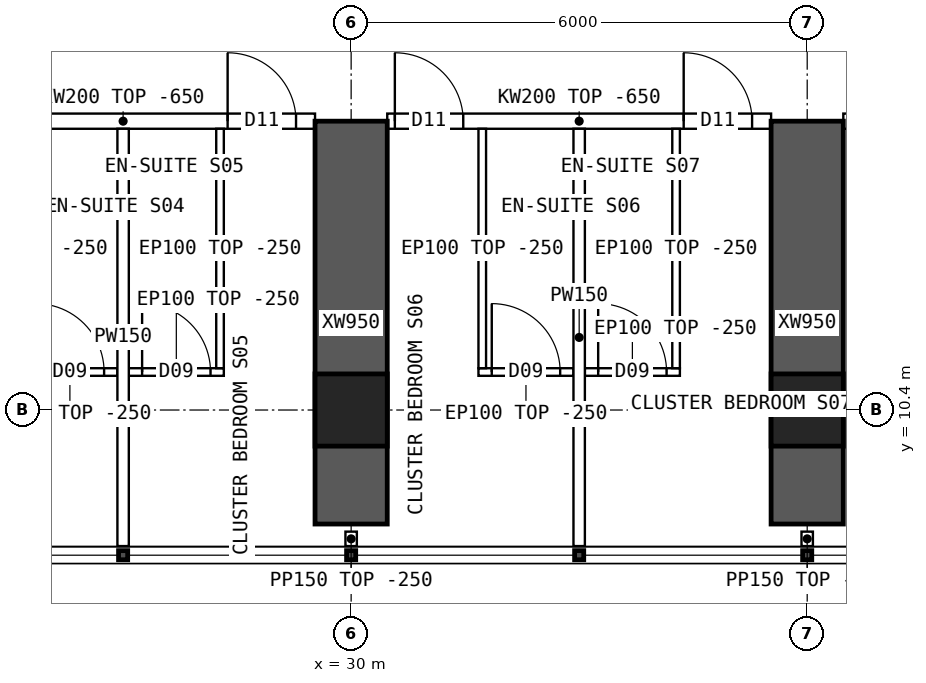
"""IFC4 building model, lengths in metres.
Left out: names, types, materials, properties, quantities, classifications, styles, units other than length and angle.
Written with IfcOpenShell. Run it as: python <this file> out.ifc"""

import sys

from ifc_helpers import new_model, si_unit, direction, frame, frame_2d, origin, origin_2d, place, context, subcontext, project, spatial, polyline, rectangle, hollow_rectangle, outline, extrude, element, fill, save


model = new_model("IFC4")
c1 = context("Model", 3, precision=1e-05, world=origin(), true_north=direction((0.0, 1.0)))
c2 = subcontext(c1, "Body", "Model", "MODEL_VIEW")
j1 = project(units=[si_unit("LENGTHUNIT", "METRE"), si_unit("PLANEANGLEUNIT", "RADIAN")], contexts=[c1])
p1 = place(None, origin())
s1 = spatial("IfcSite", under=j1, at=p1, CompositionType="ELEMENT")
p2 = place(p1, origin())
s2 = spatial("IfcBuilding", under=s1, at=p2, CompositionType="ELEMENT")
p3 = place(p2, frame((0.0, 0.0, 118.15)))
s3 = spatial("IfcBuildingStorey", under=s2, at=p3, CompositionType="ELEMENT", Elevation=118.15)
for number, where, z_axis, x_axis in (
    (1, (30.0, 10.4, 0.0), (0.0, 0.0, 1.0), (1.0, 0.0, 0.0)),
    (2, (36.0, 10.4, 0.0), (0.0, 0.0, 1.0), (1.0, 0.0, 0.0)),
):
    element("IfcColumn", number, at=place(p3, frame(where, z_axis=z_axis, x_axis=x_axis)), inside=s3, PredefinedType="COLUMN", context=c2, shape_type="SweptSolid", body=[
        extrude(hollow_rectangle(XDim=0.95, YDim=0.95, WallThickness=0.095, at=origin_2d()), origin(), (0.0, 0.0, 1.0), 3.75),
    ])
for number, where, z_axis, x_axis in (
    (3, (30.0, 8.9, 0.0), (0.0, 0.0, 1.0), (0.0, 1.0, 0.0)),
    (4, (36.0, 8.9, 0.0), (0.0, 0.0, 1.0), (0.0, 1.0, 0.0)),
):
    element("IfcWall", number, at=place(p3, frame(where, z_axis=z_axis, x_axis=x_axis)), inside=s3, PredefinedType="SHEAR", context=c2, shape_type="SweptSolid", body=[
        extrude(rectangle(XDim=5.3, YDim=0.95, at=frame_2d((2.65, 0.0))), origin(), (0.0, 0.0, 1.0), 3.75),
    ])
p4 = place(p3, frame((24.475, 14.2, 0.0), z_axis=(0.0, 0.0, 1.0), x_axis=(1.0, 0.0, 0.0)))
e5 = element("IfcWall", 5, at=p4, inside=s3, PredefinedType="SOLIDWALL", context=c2, shape_type="SweptSolid", body=[
    extrude(outline(polyline([(0.0, 0.0), (5.05, 0.0), (5.05, 3.1), (0.0, 3.1), (0.0, 0.0)])), frame((0.0, 0.1, 0.0), z_axis=(0.0, -1.0, 0.0), x_axis=(1.0, 0.0, 0.0)), (0.0, 0.0, 1.0), 0.2),
])
p5 = place(p4, frame((0.1, 0.0, 0.0)))
e6 = element("IfcOpeningElement", 6, at=p5, cuts=e5, PredefinedType="OPENING", context=c2, shape_type="SweptSolid", body=[
    extrude(rectangle(XDim=0.9, YDim=2.1, at=frame_2d((0.45, 1.05))), frame((0.0, 0.11, 0.0), z_axis=(0.0, -1.0, 0.0), x_axis=(1.0, 0.0, 0.0)), (0.0, 0.0, 1.0), 0.22),
])
p6 = place(p4, frame((3.9, 0.0, 0.0)))
e7 = element("IfcOpeningElement", 7, at=p6, cuts=e5, PredefinedType="OPENING", context=c2, shape_type="SweptSolid", body=[
    extrude(rectangle(XDim=0.9, YDim=2.1, at=frame_2d((0.45, 1.05))), frame((0.0, 0.11, 0.0), z_axis=(0.0, -1.0, 0.0), x_axis=(1.0, 0.0, 0.0)), (0.0, 0.0, 1.0), 0.22),
])
p7 = place(p3, frame((30.475, 14.2, 0.0), z_axis=(0.0, 0.0, 1.0), x_axis=(1.0, 0.0, 0.0)))
e8 = element("IfcWall", 8, at=p7, inside=s3, PredefinedType="SOLIDWALL", context=c2, shape_type="SweptSolid", body=[
    extrude(outline(polyline([(0.0, 0.0), (5.05, 0.0), (5.05, 3.1), (0.0, 3.1), (0.0, 0.0)])), frame((0.0, 0.1, 0.0), z_axis=(0.0, -1.0, 0.0), x_axis=(1.0, 0.0, 0.0)), (0.0, 0.0, 1.0), 0.2),
])
p8 = place(p7, frame((0.1, 0.0, 0.0)))
e9 = element("IfcOpeningElement", 9, at=p8, cuts=e8, PredefinedType="OPENING", context=c2, shape_type="SweptSolid", body=[
    extrude(rectangle(XDim=0.9, YDim=2.1, at=frame_2d((0.45, 1.05))), frame((0.0, 0.11, 0.0), z_axis=(0.0, -1.0, 0.0), x_axis=(1.0, 0.0, 0.0)), (0.0, 0.0, 1.0), 0.22),
])
p9 = place(p7, frame((3.9, 0.0, 0.0)))
e10 = element("IfcOpeningElement", 10, at=p9, cuts=e8, PredefinedType="OPENING", context=c2, shape_type="SweptSolid", body=[
    extrude(rectangle(XDim=0.9, YDim=2.1, at=frame_2d((0.45, 1.05))), frame((0.0, 0.11, 0.0), z_axis=(0.0, -1.0, 0.0), x_axis=(1.0, 0.0, 0.0)), (0.0, 0.0, 1.0), 0.22),
])
p10 = place(p3, frame((36.475, 14.2, 0.0), z_axis=(0.0, 0.0, 1.0), x_axis=(1.0, 0.0, 0.0)))
e11 = element("IfcWall", 11, at=p10, inside=s3, PredefinedType="SOLIDWALL", context=c2, shape_type="SweptSolid", body=[
    extrude(outline(polyline([(0.0, 0.0), (5.05, 0.0), (5.05, 3.1), (0.0, 3.1), (0.0, 0.0)])), frame((0.0, 0.1, 0.0), z_axis=(0.0, -1.0, 0.0), x_axis=(1.0, 0.0, 0.0)), (0.0, 0.0, 1.0), 0.2),
])
p11 = place(p10, frame((0.3, 0.0, 0.0)))
e12 = element("IfcOpeningElement", 12, at=p11, cuts=e11, PredefinedType="OPENING", context=c2, shape_type="SweptSolid", body=[
    extrude(rectangle(XDim=1.0, YDim=2.1, at=frame_2d((0.5, 1.05))), frame((0.0, 0.11, 0.0), z_axis=(0.0, -1.0, 0.0), x_axis=(1.0, 0.0, 0.0)), (0.0, 0.0, 1.0), 0.22),
])
p12 = place(p3, frame((27.0, 8.61, 0.0), z_axis=(0.0, 0.0, 1.0), x_axis=(0.0, 1.0, 0.0)))
e13 = element("IfcWall", 13, at=p12, inside=s3, PredefinedType="PARTITIONING", context=c2, shape_type="SweptSolid", body=[
    extrude(outline(polyline([(0.0, 0.0), (5.49, 0.0), (5.49, 3.1), (5.442, 3.1), (5.44, 3.5), (1.992, 3.5), (1.99, 3.1), (1.592, 3.1), (1.59, 3.5), (0.0, 3.5), (0.0, 0.0)])), frame((0.0, 0.075, 0.0), z_axis=(0.0, -1.0, 0.0), x_axis=(1.0, 0.0, 0.0)), (0.0, 0.0, 1.0), 0.15),
])
p13 = place(p3, frame((26.925, 10.9, 0.0), z_axis=(0.0, 0.0, 1.0), x_axis=(-1.0, 0.0, 0.0)))
e14 = element("IfcWall", 14, at=p13, inside=s3, PredefinedType="PARTITIONING", context=c2, shape_type="SweptSolid", body=[
    extrude(rectangle(XDim=1.25, YDim=0.1, at=frame_2d((0.625, 0.0))), origin(), (0.0, 0.0, 1.0), 3.5),
])
p14 = place(p13, frame((0.175, 0.0, 0.0)))
e15 = element("IfcOpeningElement", 15, at=p14, cuts=e14, PredefinedType="OPENING", context=c2, shape_type="SweptSolid", body=[
    extrude(rectangle(XDim=0.9, YDim=2.1, at=frame_2d((0.45, 1.05))), frame((0.0, 0.06, 0.0), z_axis=(0.0, -1.0, 0.0), x_axis=(1.0, 0.0, 0.0)), (0.0, 0.0, 1.0), 0.12),
])
p15 = place(p3, frame((28.325, 10.9, 0.0), z_axis=(0.0, 0.0, 1.0), x_axis=(-1.0, 0.0, 0.0)))
e16 = element("IfcWall", 16, at=p15, inside=s3, PredefinedType="PARTITIONING", context=c2, shape_type="SweptSolid", body=[
    extrude(rectangle(XDim=1.25, YDim=0.1, at=frame_2d((0.625, 0.0))), origin(), (0.0, 0.0, 1.0), 3.5),
])
p16 = place(p15, frame((0.175, 0.0, 0.0)))
e17 = element("IfcOpeningElement", 17, at=p16, cuts=e16, PredefinedType="OPENING", context=c2, shape_type="SweptSolid", body=[
    extrude(rectangle(XDim=0.9, YDim=2.1, at=frame_2d((0.45, 1.05))), frame((0.0, 0.06, 0.0), z_axis=(0.0, -1.0, 0.0), x_axis=(1.0, 0.0, 0.0)), (0.0, 0.0, 1.0), 0.12),
])
p17 = place(p3, frame((28.275, 10.95, 0.0), z_axis=(0.0, 0.0, 1.0), x_axis=(0.0, 1.0, 0.0)))
e18 = element("IfcWall", 18, at=p17, inside=s3, PredefinedType="PARTITIONING", context=c2, shape_type="SweptSolid", body=[
    extrude(outline(polyline([(0.0, 0.0), (3.15, 0.0), (3.15, 3.1), (3.102, 3.1), (3.1, 3.5), (0.0, 3.5), (0.0, 0.0)])), frame((0.0, 0.05, 0.0), z_axis=(0.0, -1.0, 0.0), x_axis=(1.0, 0.0, 0.0)), (0.0, 0.0, 1.0), 0.1),
])
p18 = place(p3, frame((33.0, 8.61, 0.0), z_axis=(0.0, 0.0, 1.0), x_axis=(0.0, 1.0, 0.0)))
e19 = element("IfcWall", 19, at=p18, inside=s3, PredefinedType="PARTITIONING", context=c2, shape_type="SweptSolid", body=[
    extrude(outline(polyline([(0.0, 0.0), (5.49, 0.0), (5.49, 3.1), (5.442, 3.1), (5.44, 3.5), (1.992, 3.5), (1.99, 3.1), (1.592, 3.1), (1.59, 3.5), (0.0, 3.5), (0.0, 0.0)])), frame((0.0, 0.075, 0.0), z_axis=(0.0, -1.0, 0.0), x_axis=(1.0, 0.0, 0.0)), (0.0, 0.0, 1.0), 0.15),
])
p19 = place(p3, frame((32.925, 10.9, 0.0), z_axis=(0.0, 0.0, 1.0), x_axis=(-1.0, 0.0, 0.0)))
e20 = element("IfcWall", 20, at=p19, inside=s3, PredefinedType="PARTITIONING", context=c2, shape_type="SweptSolid", body=[
    extrude(rectangle(XDim=1.25, YDim=0.1, at=frame_2d((0.625, 0.0))), origin(), (0.0, 0.0, 1.0), 3.5),
])
p20 = place(p19, frame((0.175, 0.0, 0.0)))
e21 = element("IfcOpeningElement", 21, at=p20, cuts=e20, PredefinedType="OPENING", context=c2, shape_type="SweptSolid", body=[
    extrude(rectangle(XDim=0.9, YDim=2.1, at=frame_2d((0.45, 1.05))), frame((0.0, 0.06, 0.0), z_axis=(0.0, -1.0, 0.0), x_axis=(1.0, 0.0, 0.0)), (0.0, 0.0, 1.0), 0.12),
])
p21 = place(p3, frame((31.725, 10.95, 0.0), z_axis=(0.0, 0.0, 1.0), x_axis=(0.0, 1.0, 0.0)))
e22 = element("IfcWall", 22, at=p21, inside=s3, PredefinedType="PARTITIONING", context=c2, shape_type="SweptSolid", body=[
    extrude(outline(polyline([(0.0, 0.0), (3.15, 0.0), (3.15, 3.1), (3.102, 3.1), (3.1, 3.5), (0.0, 3.5), (0.0, 0.0)])), frame((0.0, 0.05, 0.0), z_axis=(0.0, -1.0, 0.0), x_axis=(1.0, 0.0, 0.0)), (0.0, 0.0, 1.0), 0.1),
])
p22 = place(p3, frame((34.325, 10.9, 0.0), z_axis=(0.0, 0.0, 1.0), x_axis=(-1.0, 0.0, 0.0)))
e23 = element("IfcWall", 23, at=p22, inside=s3, PredefinedType="PARTITIONING", context=c2, shape_type="SweptSolid", body=[
    extrude(rectangle(XDim=1.25, YDim=0.1, at=frame_2d((0.625, 0.0))), origin(), (0.0, 0.0, 1.0), 3.5),
])
p23 = place(p22, frame((0.175, 0.0, 0.0)))
e24 = element("IfcOpeningElement", 24, at=p23, cuts=e23, PredefinedType="OPENING", context=c2, shape_type="SweptSolid", body=[
    extrude(rectangle(XDim=0.9, YDim=2.1, at=frame_2d((0.45, 1.05))), frame((0.0, 0.06, 0.0), z_axis=(0.0, -1.0, 0.0), x_axis=(1.0, 0.0, 0.0)), (0.0, 0.0, 1.0), 0.12),
])
p24 = place(p3, frame((34.275, 10.95, 0.0), z_axis=(0.0, 0.0, 1.0), x_axis=(0.0, 1.0, 0.0)))
e25 = element("IfcWall", 25, at=p24, inside=s3, PredefinedType="PARTITIONING", context=c2, shape_type="SweptSolid", body=[
    extrude(outline(polyline([(0.0, 0.0), (3.15, 0.0), (3.15, 3.1), (3.102, 3.1), (3.1, 3.5), (0.0, 3.5), (0.0, 0.0)])), frame((0.0, 0.05, 0.0), z_axis=(0.0, -1.0, 0.0), x_axis=(1.0, 0.0, 0.0)), (0.0, 0.0, 1.0), 0.1),
])
for number, where, z_axis, x_axis in (
    (26, (30.0, 8.8, 0.0), (0.0, 0.0, 1.0), (0.0, -1.0, 0.0)),
    (27, (36.0, 8.8, 0.0), (0.0, 0.0, 1.0), (0.0, -1.0, 0.0)),
):
    element("IfcWall", number, at=place(p3, frame(where, z_axis=z_axis, x_axis=x_axis)), inside=s3, PredefinedType="PARTITIONING", context=c2, shape_type="SweptSolid", body=[
        extrude(rectangle(XDim=0.19, YDim=0.15, at=frame_2d((0.095, 0.0))), origin(), (0.0, 0.0, 1.0), 3.5),
    ])
p25 = place(p14, origin())
e28 = element("IfcDoor", 28, at=p25, inside=s3, OperationType="SINGLE_SWING_RIGHT", PredefinedType="DOOR", context=c2, shape_type="SweptSolid", body=[
    extrude(rectangle(XDim=0.9, YDim=2.1, at=frame_2d((0.45, 1.05))), frame((0.0, 0.025, 0.0), z_axis=(0.0, -1.0, 0.0), x_axis=(1.0, 0.0, 0.0)), (0.0, 0.0, 1.0), 0.05),
])
fill(e15, e28)
p26 = place(p16, origin())
e29 = element("IfcDoor", 29, at=p26, inside=s3, OperationType="SINGLE_SWING_RIGHT", PredefinedType="DOOR", context=c2, shape_type="SweptSolid", body=[
    extrude(rectangle(XDim=0.9, YDim=2.1, at=frame_2d((0.45, 1.05))), frame((0.0, 0.025, 0.0), z_axis=(0.0, -1.0, 0.0), x_axis=(1.0, 0.0, 0.0)), (0.0, 0.0, 1.0), 0.05),
])
fill(e17, e29)
p27 = place(p6, origin())
e30 = element("IfcDoor", 30, at=p27, inside=s3, OperationType="SINGLE_SWING_LEFT", PredefinedType="DOOR", context=c2, shape_type="SweptSolid", body=[
    extrude(rectangle(XDim=0.9, YDim=2.1, at=frame_2d((0.45, 1.05))), frame((0.0, 0.025, 0.0), z_axis=(0.0, -1.0, 0.0), x_axis=(1.0, 0.0, 0.0)), (0.0, 0.0, 1.0), 0.05),
])
fill(e7, e30)
p28 = place(p20, origin())
e31 = element("IfcDoor", 31, at=p28, inside=s3, OperationType="SINGLE_SWING_RIGHT", PredefinedType="DOOR", context=c2, shape_type="SweptSolid", body=[
    extrude(rectangle(XDim=0.9, YDim=2.1, at=frame_2d((0.45, 1.05))), frame((0.0, 0.025, 0.0), z_axis=(0.0, -1.0, 0.0), x_axis=(1.0, 0.0, 0.0)), (0.0, 0.0, 1.0), 0.05),
])
fill(e21, e31)
p29 = place(p8, origin())
e32 = element("IfcDoor", 32, at=p29, inside=s3, OperationType="SINGLE_SWING_LEFT", PredefinedType="DOOR", context=c2, shape_type="SweptSolid", body=[
    extrude(rectangle(XDim=0.9, YDim=2.1, at=frame_2d((0.45, 1.05))), frame((0.0, 0.025, 0.0), z_axis=(0.0, -1.0, 0.0), x_axis=(1.0, 0.0, 0.0)), (0.0, 0.0, 1.0), 0.05),
])
fill(e9, e32)
p30 = place(p23, origin())
e33 = element("IfcDoor", 33, at=p30, inside=s3, OperationType="SINGLE_SWING_RIGHT", PredefinedType="DOOR", context=c2, shape_type="SweptSolid", body=[
    extrude(rectangle(XDim=0.9, YDim=2.1, at=frame_2d((0.45, 1.05))), frame((0.0, 0.025, 0.0), z_axis=(0.0, -1.0, 0.0), x_axis=(1.0, 0.0, 0.0)), (0.0, 0.0, 1.0), 0.05),
])
fill(e24, e33)
p31 = place(p9, origin())
e34 = element("IfcDoor", 34, at=p31, inside=s3, OperationType="SINGLE_SWING_LEFT", PredefinedType="DOOR", context=c2, shape_type="SweptSolid", body=[
    extrude(rectangle(XDim=0.9, YDim=2.1, at=frame_2d((0.45, 1.05))), frame((0.0, 0.025, 0.0), z_axis=(0.0, -1.0, 0.0), x_axis=(1.0, 0.0, 0.0)), (0.0, 0.0, 1.0), 0.05),
])
fill(e10, e34)
save(model, sys.argv[1])
